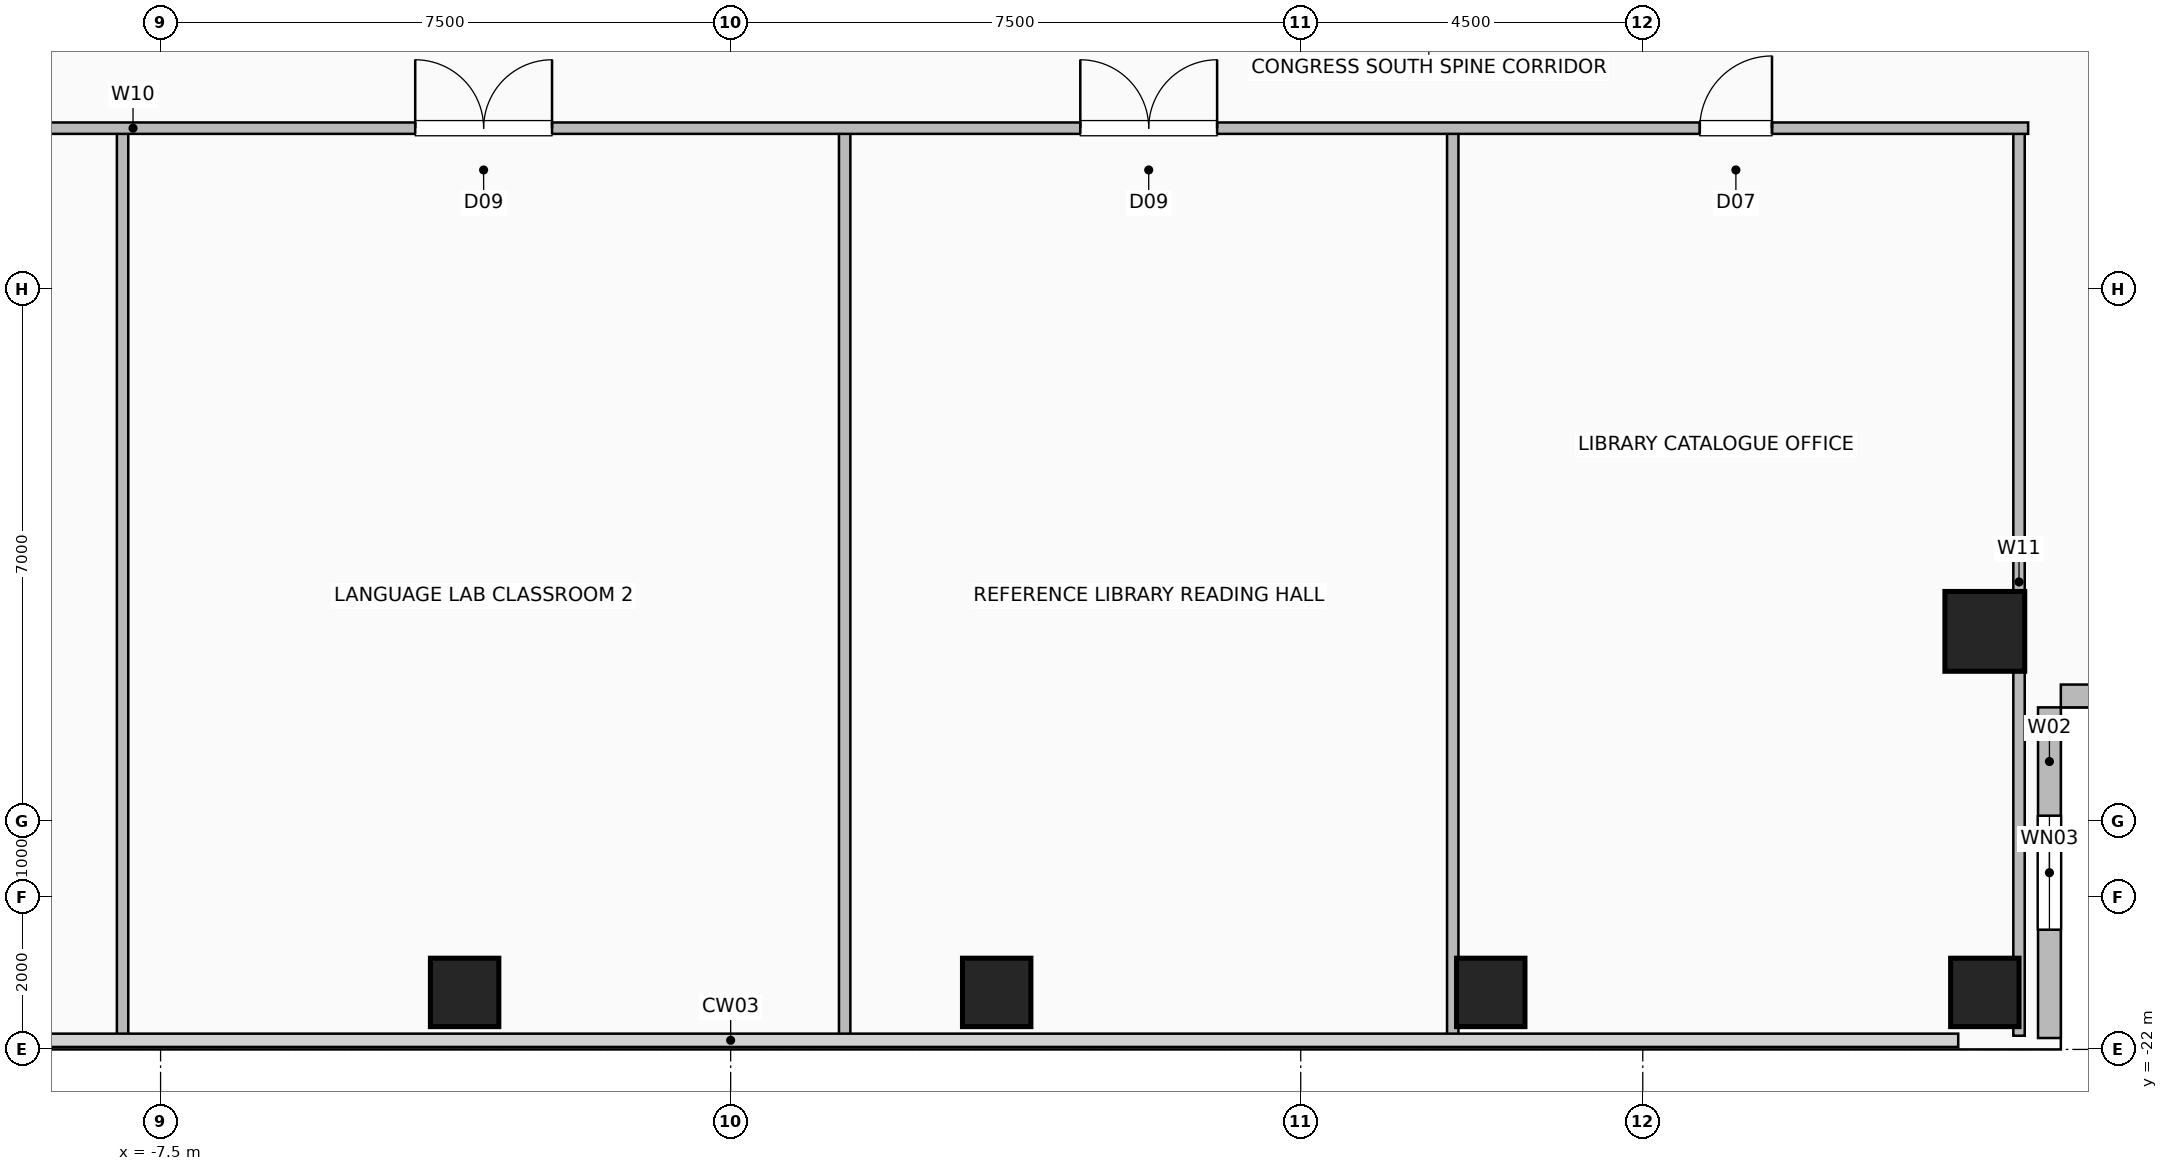
"""IFC4 building model, lengths in metres.
Left out: names, types, materials, properties, quantities, classifications, styles, units other than length and angle.
Written with IfcOpenShell. Run it as: python <this file> out.ifc"""

import sys

from ifc_helpers import new_model, si_unit, direction, frame, frame_2d, origin, origin_2d, place, context, subcontext, project, spatial, rectangle, hollow_rectangle, extrude, element, fill, save


model = new_model("IFC4")
c1 = context("Model", 3, precision=1e-05, world=origin(), true_north=direction((0.0, 1.0)))
c2 = subcontext(c1, "Body", "Model", "MODEL_VIEW")
j1 = project(units=[si_unit("LENGTHUNIT", "METRE"), si_unit("PLANEANGLEUNIT", "RADIAN")], contexts=[c1])
p1 = place(None, origin())
s1 = spatial("IfcSite", under=j1, at=p1, CompositionType="ELEMENT")
p2 = place(p1, origin())
s2 = spatial("IfcBuilding", under=s1, at=p2, CompositionType="ELEMENT")
p3 = place(p2, frame((0.0, 0.0, 130.0)))
s3 = spatial("IfcBuildingStorey", under=s2, at=p3, CompositionType="ELEMENT", Elevation=130.0)
for number, where, z_axis, x_axis in (
    (1, (-3.5, -21.25, 0.0), (0.0, 0.0, 1.0), (1.0, 0.0, 0.0)),
    (2, (3.5, -21.25, 0.0), (0.0, 0.0, 1.0), (1.0, 0.0, 0.0)),
    (3, (10.0, -21.25, 0.0), (0.0, 0.0, 1.0), (1.0, 0.0, 0.0)),
    (4, (16.5, -21.25, 0.0), (0.0, 0.0, 1.0), (1.0, 0.0, 0.0)),
):
    element("IfcColumn", number, at=place(p3, frame(where, z_axis=z_axis, x_axis=x_axis)), inside=s3, PredefinedType="COLUMN", context=c2, shape_type="SweptSolid", body=[
        extrude(hollow_rectangle(XDim=0.9, YDim=0.9, WallThickness=0.045, at=origin_2d()), origin(), (0.0, 0.0, 1.0), 3.6),
    ])
p4 = place(p3, frame((16.5, -16.5, 0.0), z_axis=(0.0, 0.0, 1.0), x_axis=(1.0, 0.0, 0.0)))
e5 = element("IfcColumn", 5, at=p4, inside=s3, PredefinedType="COLUMN", context=c2, shape_type="SweptSolid", body=[
    extrude(hollow_rectangle(XDim=1.05, YDim=1.05, WallThickness=0.05, at=origin_2d()), origin(), (0.0, 0.0, 1.0), 3.6),
])
p5 = place(p3, frame((17.35, -21.85, 0.0), z_axis=(0.0, 0.0, 1.0), x_axis=(0.0, 1.0, 0.0)))
e6 = element("IfcWall", 6, at=p5, inside=s3, PredefinedType="SOLIDWALL", context=c2, shape_type="SweptSolid", body=[
    extrude(rectangle(XDim=4.35, YDim=0.3, at=frame_2d((2.175, 0.0))), origin(), (0.0, 0.0, 1.0), 3.36),
])
p6 = place(p5, frame((1.425, 0.0, 0.9)))
e7 = element("IfcOpeningElement", 7, at=p6, cuts=e6, PredefinedType="OPENING", context=c2, shape_type="SweptSolid", body=[
    extrude(rectangle(XDim=1.5, YDim=1.8, at=frame_2d((0.75, 0.9))), frame((0.0, 0.16, 0.0), z_axis=(0.0, -1.0, 0.0), x_axis=(1.0, 0.0, 0.0)), (0.0, 0.0, 1.0), 0.32),
])
p7 = place(p3, frame((21.85, -17.35, 0.0), z_axis=(0.0, 0.0, 1.0), x_axis=(-1.0, 0.0, 0.0)))
e8 = element("IfcWall", 8, at=p7, inside=s3, PredefinedType="SOLIDWALL", context=c2, shape_type="SweptSolid", body=[
    extrude(rectangle(XDim=4.35, YDim=0.3, at=frame_2d((2.175, 0.0))), origin(), (0.0, 0.0, 1.0), 3.36),
])
for number, where, z_axis, x_axis in (
    (9, (-8.0, -21.82, 0.0), (0.0, 0.0, 1.0), (0.0, 1.0, 0.0)),
    (10, (1.5, -21.82, 0.0), (0.0, 0.0, 1.0), (0.0, 1.0, 0.0)),
    (11, (9.5, -21.82, 0.0), (0.0, 0.0, 1.0), (0.0, 1.0, 0.0)),
    (12, (16.95, -21.82, 0.0), (0.0, 0.0, 1.0), (0.0, 1.0, 0.0)),
):
    element("IfcWall", number, at=place(p3, frame(where, z_axis=z_axis, x_axis=x_axis)), inside=s3, PredefinedType="PARTITIONING", context=c2, shape_type="SweptSolid", body=[
        extrude(rectangle(XDim=11.94, YDim=0.15, at=frame_2d((5.97, 0.0))), origin(), (0.0, 0.0, 1.0), 3.36),
    ])
p8 = place(p3, frame((-17.07, -9.88, 0.0), z_axis=(0.0, 0.0, 1.0), x_axis=(1.0, 0.0, 0.0)))
e13 = element("IfcWall", 13, at=p8, inside=s3, PredefinedType="PARTITIONING", context=c2, shape_type="SweptSolid", body=[
    extrude(rectangle(XDim=34.14, YDim=0.15, at=frame_2d((17.07, 0.0))), origin(), (0.0, 0.0, 1.0), 3.36),
])
p9 = place(p8, frame((3.695, 0.0, 0.0)))
e14 = element("IfcOpeningElement", 14, at=p9, cuts=e13, PredefinedType="OPENING", context=c2, shape_type="SweptSolid", body=[
    extrude(rectangle(XDim=1.8, YDim=2.08, at=frame_2d((0.9, 1.04))), frame((0.0, 0.085, 0.0), z_axis=(0.0, -1.0, 0.0), x_axis=(1.0, 0.0, 0.0)), (0.0, 0.0, 1.0), 0.17),
])
p10 = place(p8, frame((12.92, 0.0, 0.0)))
e15 = element("IfcOpeningElement", 15, at=p10, cuts=e13, PredefinedType="OPENING", context=c2, shape_type="SweptSolid", body=[
    extrude(rectangle(XDim=1.8, YDim=2.08, at=frame_2d((0.9, 1.04))), frame((0.0, 0.085, 0.0), z_axis=(0.0, -1.0, 0.0), x_axis=(1.0, 0.0, 0.0)), (0.0, 0.0, 1.0), 0.17),
])
p11 = place(p8, frame((21.67, 0.0, 0.0)))
e16 = element("IfcOpeningElement", 16, at=p11, cuts=e13, PredefinedType="OPENING", context=c2, shape_type="SweptSolid", body=[
    extrude(rectangle(XDim=1.8, YDim=2.08, at=frame_2d((0.9, 1.04))), frame((0.0, 0.085, 0.0), z_axis=(0.0, -1.0, 0.0), x_axis=(1.0, 0.0, 0.0)), (0.0, 0.0, 1.0), 0.17),
])
p12 = place(p8, frame((29.82, 0.0, 0.0)))
e17 = element("IfcOpeningElement", 17, at=p12, cuts=e13, PredefinedType="OPENING", context=c2, shape_type="SweptSolid", body=[
    extrude(rectangle(XDim=0.95, YDim=2.06, at=frame_2d((0.475, 1.03))), frame((0.0, 0.085, 0.0), z_axis=(0.0, -1.0, 0.0), x_axis=(1.0, 0.0, 0.0)), (0.0, 0.0, 1.0), 0.17),
])
p13 = place(p6, origin())
e18 = element("IfcWindow", 18, at=p13, inside=s3, PartitioningType="SINGLE_PANEL", PredefinedType="WINDOW", context=c2, shape_type="SweptSolid", body=[
    extrude(rectangle(XDim=1.5, YDim=1.8, at=frame_2d((0.75, 0.9))), frame((0.0, 0.03, 0.0), z_axis=(0.0, -1.0, 0.0), x_axis=(1.0, 0.0, 0.0)), (0.0, 0.0, 1.0), 0.06),
])
fill(e7, e18)
p14 = place(p10, origin())
e19 = element("IfcDoor", 19, at=p14, inside=s3, OperationType="DOUBLE_DOOR_SINGLE_SWING", PredefinedType="DOOR", context=c2, shape_type="SweptSolid", body=[
    extrude(rectangle(XDim=1.8, YDim=2.08, at=frame_2d((0.9, 1.04))), frame((0.0, 0.025, 0.0), z_axis=(0.0, -1.0, 0.0), x_axis=(1.0, 0.0, 0.0)), (0.0, 0.0, 1.0), 0.05),
])
fill(e15, e19)
p15 = place(p11, origin())
e20 = element("IfcDoor", 20, at=p15, inside=s3, OperationType="DOUBLE_DOOR_SINGLE_SWING", PredefinedType="DOOR", context=c2, shape_type="SweptSolid", body=[
    extrude(rectangle(XDim=1.8, YDim=2.08, at=frame_2d((0.9, 1.04))), frame((0.0, 0.025, 0.0), z_axis=(0.0, -1.0, 0.0), x_axis=(1.0, 0.0, 0.0)), (0.0, 0.0, 1.0), 0.05),
])
fill(e16, e20)
p16 = place(p12, origin())
e21 = element("IfcDoor", 21, at=p16, inside=s3, OperationType="SINGLE_SWING_RIGHT", PredefinedType="DOOR", context=c2, shape_type="SweptSolid", body=[
    extrude(rectangle(XDim=0.95, YDim=2.06, at=frame_2d((0.475, 1.03))), frame((0.0, 0.025, 0.0), z_axis=(0.0, -1.0, 0.0), x_axis=(1.0, 0.0, 0.0)), (0.0, 0.0, 1.0), 0.05),
])
fill(e17, e21)
save(model, sys.argv[1])
